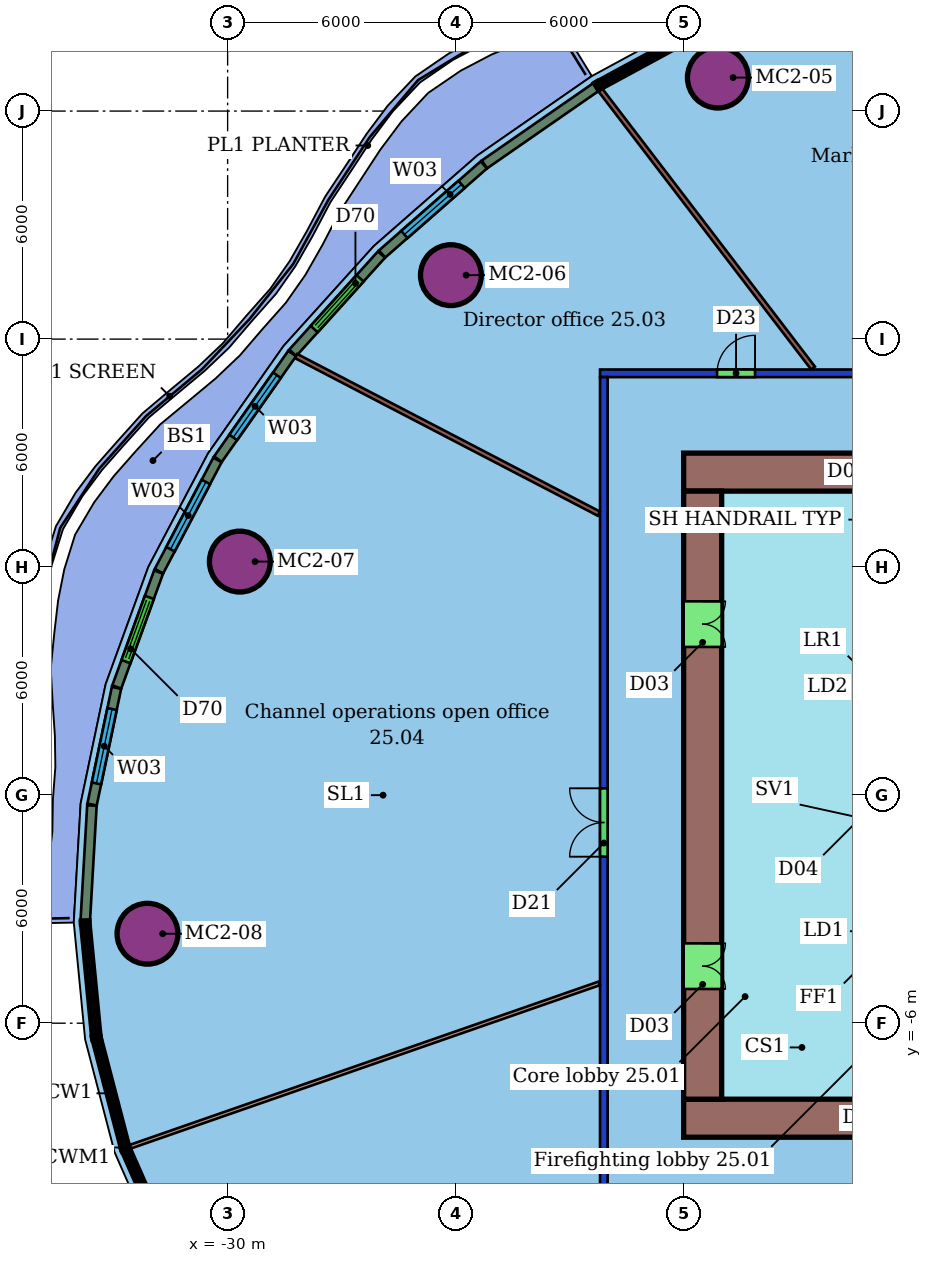
"""IFC4 building model, lengths in metres.
Left out: names, types, materials, properties, quantities, classifications, styles, units other than length and angle.
Written with IfcOpenShell. Run it as: python <this file> out.ifc"""

import sys

from ifc_helpers import new_model, si_unit, direction, frame, frame_2d, origin, origin_2d, place, context, subcontext, project, spatial, rectangle, hollow_circle, extrude, element, fill, save


model = new_model("IFC4")
c1 = context("Model", 3, precision=1e-05, world=origin(), true_north=direction((0.0, 1.0)))
c2 = subcontext(c1, "Body", "Model", "MODEL_VIEW")
j1 = project(units=[si_unit("LENGTHUNIT", "METRE"), si_unit("PLANEANGLEUNIT", "RADIAN")], contexts=[c1])
p1 = place(None, origin())
s1 = spatial("IfcSite", under=j1, at=p1, CompositionType="ELEMENT")
p2 = place(p1, origin())
s2 = spatial("IfcBuilding", under=s1, at=p2, CompositionType="ELEMENT")
p3 = place(p2, frame((0.0, 0.0, 110.2)))
s3 = spatial("IfcBuildingStorey", under=s2, at=p3, CompositionType="ELEMENT", Elevation=110.2)
for number, where, z_axis, x_axis in (
    (1, (-17.1, 18.881, 0.0), (0.0, 0.0, 1.0), (1.0, 0.0, 0.0)),
    (2, (-24.125, 13.683, 0.0), (0.0, 0.0, 1.0), (1.0, 0.0, 0.0)),
    (3, (-29.679, 6.146, 0.0), (0.0, 0.0, 1.0), (1.0, 0.0, 0.0)),
    (4, (-32.109, -3.646, 0.0), (0.0, 0.0, 1.0), (1.0, 0.0, 0.0)),
):
    element("IfcColumn", number, at=place(p3, frame(where, z_axis=z_axis, x_axis=x_axis)), inside=s3, PredefinedType="COLUMN", context=c2, shape_type="SweptSolid", body=[
        extrude(hollow_circle(Radius=0.8, WallThickness=0.055, at=origin_2d()), origin(), (0.0, 0.0, 1.0), 3.45),
    ])
p4 = place(p3, frame((-20.1, -11.0, 0.0), z_axis=(0.0, 0.0, 1.0), x_axis=(0.0, 1.0, 0.0)))
e5 = element("IfcWall", 5, at=p4, inside=s3, PredefinedType="PARTITIONING", context=c2, shape_type="SweptSolid", body=[
    extrude(rectangle(XDim=22.0, YDim=0.2, at=frame_2d((11.0, 0.0))), origin(), (0.0, 0.0, 1.0), 3.0),
])
p5 = place(p4, frame((9.381, 0.0, 0.0)))
e6 = element("IfcOpeningElement", 6, at=p5, cuts=e5, PredefinedType="OPENING", context=c2, shape_type="SweptSolid", body=[
    extrude(rectangle(XDim=1.8, YDim=2.1, at=frame_2d((0.9, 1.05))), frame((0.0, 0.11, 0.0), z_axis=(0.0, -1.0, 0.0), x_axis=(1.0, 0.0, 0.0)), (0.0, 0.0, 1.0), 0.22),
])
p6 = place(p3, frame((-20.2, 11.1, 0.0), z_axis=(0.0, 0.0, 1.0), x_axis=(1.0, 0.0, 0.0)))
e7 = element("IfcWall", 7, at=p6, inside=s3, PredefinedType="PARTITIONING", context=c2, shape_type="SweptSolid", body=[
    extrude(rectangle(XDim=28.4, YDim=0.2, at=frame_2d((14.2, 0.0))), origin(), (0.0, 0.0, 1.0), 3.0),
])
p7 = place(p6, frame((17.12, 0.0, 0.0)))
e8 = element("IfcOpeningElement", 8, at=p7, cuts=e7, PredefinedType="OPENING", context=c2, shape_type="SweptSolid", body=[
    extrude(rectangle(XDim=1.8, YDim=2.1, at=frame_2d((0.9, 1.05))), frame((0.0, 0.11, 0.0), z_axis=(0.0, -1.0, 0.0), x_axis=(1.0, 0.0, 0.0)), (0.0, 0.0, 1.0), 0.22),
])
p8 = place(p6, frame((8.01, 0.0, 0.0)))
e9 = element("IfcOpeningElement", 9, at=p8, cuts=e7, PredefinedType="OPENING", context=c2, shape_type="SweptSolid", body=[
    extrude(rectangle(XDim=1.0, YDim=2.1, at=frame_2d((0.5, 1.05))), frame((0.0, 0.11, 0.0), z_axis=(0.0, -1.0, 0.0), x_axis=(1.0, 0.0, 0.0)), (0.0, 0.0, 1.0), 0.22),
])
p9 = place(p6, frame((3.078, 0.0, 0.0)))
e10 = element("IfcOpeningElement", 10, at=p9, cuts=e7, PredefinedType="OPENING", context=c2, shape_type="SweptSolid", body=[
    extrude(rectangle(XDim=1.0, YDim=2.4, at=frame_2d((0.5, 1.2))), frame((0.0, 0.11, 0.0), z_axis=(0.0, -1.0, 0.0), x_axis=(1.0, 0.0, 0.0)), (0.0, 0.0, 1.0), 0.22),
])
p10 = place(p3, frame((-20.195, 18.558, 0.0), z_axis=(0.0, 0.0, 1.0), x_axis=(0.607534665721, -0.79429316373, 0.0)))
e11 = element("IfcWall", 11, at=p10, inside=s3, PredefinedType="PARTITIONING", context=c2, shape_type="SweptSolid", body=[
    extrude(rectangle(XDim=9.216, YDim=0.125, at=frame_2d((4.608, 0.0))), origin(), (0.0, 0.0, 1.0), 3.45),
])
p11 = place(p3, frame((-28.197, 11.553, 0.0), z_axis=(0.0, 0.0, 1.0), x_axis=(0.887035614959, -0.461701004759, 0.0)))
e12 = element("IfcWall", 12, at=p11, inside=s3, PredefinedType="PARTITIONING", context=c2, shape_type="SweptSolid", body=[
    extrude(rectangle(XDim=8.982, YDim=0.125, at=frame_2d((4.491, 0.0))), origin(), (0.0, 0.0, 1.0), 3.45),
])
p12 = place(p3, frame((-32.574, -9.254, 0.0), z_axis=(0.0, 0.0, 1.0), x_axis=(0.944372639041, 0.328877361079, 0.0)))
e13 = element("IfcWall", 13, at=p12, inside=s3, PredefinedType="PARTITIONING", context=c2, shape_type="SweptSolid", body=[
    extrude(rectangle(XDim=13.085, YDim=0.1, at=frame_2d((6.542, 0.0))), origin(), (0.0, 0.0, 1.0), 3.45),
])
p13 = place(p3, frame((-20.305, 18.633, 0.0), z_axis=(0.0, 0.0, 1.0), x_axis=(-0.821702391874, -0.56991681778, 0.0)))
e14 = element("IfcWall", 14, at=p13, inside=s3, PredefinedType="SOLIDWALL", context=c2, shape_type="SweptSolid", body=[
    extrude(rectangle(XDim=3.573, YDim=0.25, at=frame_2d((1.787, 0.0))), origin(), (0.0, 0.0, 1.0), 3.05),
])
p14 = place(p3, frame((-23.259, 16.583, 0.0), z_axis=(0.0, 0.0, 1.0), x_axis=(-0.752389619374, -0.658718346988, 0.0)))
e15 = element("IfcWall", 15, at=p14, inside=s3, PredefinedType="SOLIDWALL", context=c2, shape_type="SweptSolid", body=[
    extrude(rectangle(XDim=3.558, YDim=0.25, at=frame_2d((1.779, 0.0))), origin(), (0.0, 0.0, 1.0), 3.05),
])
p15 = place(p14, frame((0.779, 0.0, 0.9)))
e16 = element("IfcOpeningElement", 16, at=p15, cuts=e15, PredefinedType="OPENING", context=c2, shape_type="SweptSolid", body=[
    extrude(rectangle(XDim=2.0, YDim=2.1, at=frame_2d((1.0, 1.05))), frame((0.0, 0.135, 0.0), z_axis=(0.0, -1.0, 0.0), x_axis=(1.0, 0.0, 0.0)), (0.0, 0.0, 1.0), 0.27),
])
p16 = place(p3, frame((-25.951, 14.224, 0.0), z_axis=(0.0, 0.0, 1.0), x_axis=(-0.670380889725, -0.74201715795, 0.0)))
e17 = element("IfcWall", 17, at=p16, inside=s3, PredefinedType="SOLIDWALL", context=c2, shape_type="SweptSolid", body=[
    extrude(rectangle(XDim=3.483, YDim=0.25, at=frame_2d((1.742, 0.0))), origin(), (0.0, 0.0, 1.0), 3.05),
])
p17 = place(p16, frame((0.842, 0.0, 0.0)))
e18 = element("IfcOpeningElement", 18, at=p17, cuts=e17, PredefinedType="OPENING", context=c2, shape_type="SweptSolid", body=[
    extrude(rectangle(XDim=1.8, YDim=2.4, at=frame_2d((0.9, 1.2))), frame((0.0, 0.135, 0.0), z_axis=(0.0, -1.0, 0.0), x_axis=(1.0, 0.0, 0.0)), (0.0, 0.0, 1.0), 0.27),
])
p18 = place(p3, frame((-28.301, 11.622, 0.0), z_axis=(0.0, 0.0, 1.0), x_axis=(-0.57497541368, -0.818170687365, 0.0)))
e19 = element("IfcWall", 19, at=p18, inside=s3, PredefinedType="SOLIDWALL", context=c2, shape_type="SweptSolid", body=[
    extrude(rectangle(XDim=3.398, YDim=0.25, at=frame_2d((1.699, 0.0))), origin(), (0.0, 0.0, 1.0), 3.05),
])
p19 = place(p18, frame((0.699, 0.0, 0.9)))
e20 = element("IfcOpeningElement", 20, at=p19, cuts=e19, PredefinedType="OPENING", context=c2, shape_type="SweptSolid", body=[
    extrude(rectangle(XDim=2.0, YDim=2.1, at=frame_2d((1.0, 1.05))), frame((0.0, 0.135, 0.0), z_axis=(0.0, -1.0, 0.0), x_axis=(1.0, 0.0, 0.0)), (0.0, 0.0, 1.0), 0.27),
])
p20 = place(p3, frame((-30.267, 8.821, 0.0), z_axis=(0.0, 0.0, 1.0), x_axis=(-0.465454364303, -0.885071881121, 0.0)))
e21 = element("IfcWall", 21, at=p20, inside=s3, PredefinedType="SOLIDWALL", context=c2, shape_type="SweptSolid", body=[
    extrude(rectangle(XDim=3.308, YDim=0.25, at=frame_2d((1.654, 0.0))), origin(), (0.0, 0.0, 1.0), 3.05),
])
p21 = place(p20, frame((0.654, 0.0, 0.9)))
e22 = element("IfcOpeningElement", 22, at=p21, cuts=e21, PredefinedType="OPENING", context=c2, shape_type="SweptSolid", body=[
    extrude(rectangle(XDim=2.0, YDim=2.1, at=frame_2d((1.0, 1.05))), frame((0.0, 0.135, 0.0), z_axis=(0.0, -1.0, 0.0), x_axis=(1.0, 0.0, 0.0)), (0.0, 0.0, 1.0), 0.27),
])
p22 = place(p3, frame((-31.817, 5.871, 0.0), z_axis=(0.0, 0.0, 1.0), x_axis=(-0.341877080841, -0.93974467894, 0.0)))
e23 = element("IfcWall", 23, at=p22, inside=s3, PredefinedType="SOLIDWALL", context=c2, shape_type="SweptSolid", body=[
    extrude(rectangle(XDim=3.218, YDim=0.25, at=frame_2d((1.609, 0.0))), origin(), (0.0, 0.0, 1.0), 3.05),
])
p23 = place(p22, frame((0.709, 0.0, 0.0)))
e24 = element("IfcOpeningElement", 24, at=p23, cuts=e23, PredefinedType="OPENING", context=c2, shape_type="SweptSolid", body=[
    extrude(rectangle(XDim=1.8, YDim=2.4, at=frame_2d((0.9, 1.2))), frame((0.0, 0.135, 0.0), z_axis=(0.0, -1.0, 0.0), x_axis=(1.0, 0.0, 0.0)), (0.0, 0.0, 1.0), 0.27),
])
p24 = place(p3, frame((-32.924, 2.822, 0.0), z_axis=(0.0, 0.0, 1.0), x_axis=(-0.205198000351, -0.978720481369, 0.0)))
e25 = element("IfcWall", 25, at=p24, inside=s3, PredefinedType="SOLIDWALL", context=c2, shape_type="SweptSolid", body=[
    extrude(rectangle(XDim=3.135, YDim=0.25, at=frame_2d((1.567, 0.0))), origin(), (0.0, 0.0, 1.0), 3.05),
])
p25 = place(p24, frame((0.567, 0.0, 0.9)))
e26 = element("IfcOpeningElement", 26, at=p25, cuts=e25, PredefinedType="OPENING", context=c2, shape_type="SweptSolid", body=[
    extrude(rectangle(XDim=2.0, YDim=2.1, at=frame_2d((1.0, 1.05))), frame((0.0, 0.135, 0.0), z_axis=(0.0, -1.0, 0.0), x_axis=(1.0, 0.0, 0.0)), (0.0, 0.0, 1.0), 0.27),
])
p26 = place(p3, frame((-33.571, -0.273, 0.0), z_axis=(0.0, 0.0, 1.0), x_axis=(-0.057638311383, -0.998337530628, 0.0)))
e27 = element("IfcWall", 27, at=p26, inside=s3, PredefinedType="SOLIDWALL", context=c2, shape_type="SweptSolid", body=[
    extrude(rectangle(XDim=3.024, YDim=0.25, at=frame_2d((1.512, 0.0))), origin(), (0.0, 0.0, 1.0), 3.05),
])
p27 = place(p3, frame((-6.0, 8.5, 0.0), z_axis=(0.0, 0.0, 1.0), x_axis=(-1.0, 0.0, 0.0)))
e28 = element("IfcWall", 28, at=p27, inside=s3, PredefinedType="SHEAR", context=c2, shape_type="SweptSolid", body=[
    extrude(rectangle(XDim=12.0, YDim=1.0, at=frame_2d((6.0, 0.0))), origin(), (0.0, 0.0, 1.0), 3.3),
])
p28 = place(p27, frame((5.2, 0.0, 0.0)))
e29 = element("IfcOpeningElement", 29, at=p28, cuts=e28, PredefinedType="OPENING", context=c2, shape_type="SweptSolid", body=[
    extrude(rectangle(XDim=1.2, YDim=2.1, at=frame_2d((0.6, 1.05))), frame((0.0, 0.51, 0.0), z_axis=(0.0, -1.0, 0.0), x_axis=(1.0, 0.0, 0.0)), (0.0, 0.0, 1.0), 1.02),
])
p29 = place(p3, frame((-18.0, -8.5, 0.0), z_axis=(0.0, 0.0, 1.0), x_axis=(1.0, 0.0, 0.0)))
e30 = element("IfcWall", 30, at=p29, inside=s3, PredefinedType="SHEAR", context=c2, shape_type="SweptSolid", body=[
    extrude(rectangle(XDim=24.0, YDim=1.0, at=frame_2d((12.0, 0.0))), origin(), (0.0, 0.0, 1.0), 3.3),
])
p30 = place(p29, frame((6.0, 0.0, 0.0)))
e31 = element("IfcOpeningElement", 31, at=p30, cuts=e30, PredefinedType="OPENING", context=c2, shape_type="SweptSolid", body=[
    extrude(rectangle(XDim=1.2, YDim=2.1, at=frame_2d((0.6, 1.05))), frame((0.0, 0.51, 0.0), z_axis=(0.0, -1.0, 0.0), x_axis=(1.0, 0.0, 0.0)), (0.0, 0.0, 1.0), 1.02),
])
p31 = place(p3, frame((-17.5, 8.0, 0.0), z_axis=(0.0, 0.0, 1.0), x_axis=(0.0, -1.0, 0.0)))
e32 = element("IfcWall", 32, at=p31, inside=s3, PredefinedType="SHEAR", context=c2, shape_type="SweptSolid", body=[
    extrude(rectangle(XDim=16.0, YDim=1.0, at=frame_2d((8.0, 0.0))), origin(), (0.0, 0.0, 1.0), 3.3),
])
p32 = place(p31, frame((11.9, 0.0, 0.0)))
e33 = element("IfcOpeningElement", 33, at=p32, cuts=e32, PredefinedType="OPENING", context=c2, shape_type="SweptSolid", body=[
    extrude(rectangle(XDim=1.2, YDim=2.1, at=frame_2d((0.6, 1.05))), frame((0.0, 0.51, 0.0), z_axis=(0.0, -1.0, 0.0), x_axis=(1.0, 0.0, 0.0)), (0.0, 0.0, 1.0), 1.02),
])
p33 = place(p31, frame((2.9, 0.0, 0.0)))
e34 = element("IfcOpeningElement", 34, at=p33, cuts=e32, PredefinedType="OPENING", context=c2, shape_type="SweptSolid", body=[
    extrude(rectangle(XDim=1.2, YDim=2.1, at=frame_2d((0.6, 1.05))), frame((0.0, 0.51, 0.0), z_axis=(0.0, -1.0, 0.0), x_axis=(1.0, 0.0, 0.0)), (0.0, 0.0, 1.0), 1.02),
])
p34 = place(p9, origin())
e35 = element("IfcDoor", 35, at=p34, inside=s3, OperationType="SINGLE_SWING_RIGHT", PredefinedType="DOOR", context=c2, shape_type="SweptSolid", body=[
    extrude(rectangle(XDim=1.0, YDim=2.4, at=frame_2d((0.5, 1.2))), frame((0.0, 0.025, 0.0), z_axis=(0.0, -1.0, 0.0), x_axis=(1.0, 0.0, 0.0)), (0.0, 0.0, 1.0), 0.05),
])
fill(e10, e35)
p35 = place(p5, origin())
e36 = element("IfcDoor", 36, at=p35, inside=s3, OperationType="DOUBLE_DOOR_SINGLE_SWING", PredefinedType="DOOR", context=c2, shape_type="SweptSolid", body=[
    extrude(rectangle(XDim=1.8, YDim=2.1, at=frame_2d((0.9, 1.05))), frame((0.0, 0.025, 0.0), z_axis=(0.0, -1.0, 0.0), x_axis=(1.0, 0.0, 0.0)), (0.0, 0.0, 1.0), 0.05),
])
fill(e6, e36)
p36 = place(p15, origin())
e37 = element("IfcWindow", 37, at=p36, inside=s3, PartitioningType="SINGLE_PANEL", PredefinedType="WINDOW", context=c2, shape_type="SweptSolid", body=[
    extrude(rectangle(XDim=2.0, YDim=2.1, at=frame_2d((1.0, 1.05))), frame((0.0, 0.03, 0.0), z_axis=(0.0, -1.0, 0.0), x_axis=(1.0, 0.0, 0.0)), (0.0, 0.0, 1.0), 0.06),
])
fill(e16, e37)
p37 = place(p17, origin())
e38 = element("IfcDoor", 38, at=p37, inside=s3, OperationType="DOUBLE_DOOR_SLIDING", PredefinedType="DOOR", context=c2, shape_type="SweptSolid", body=[
    extrude(rectangle(XDim=1.8, YDim=2.4, at=frame_2d((0.9, 1.2))), frame((0.0, 0.025, 0.0), z_axis=(0.0, -1.0, 0.0), x_axis=(1.0, 0.0, 0.0)), (0.0, 0.0, 1.0), 0.05),
])
fill(e18, e38)
p38 = place(p19, origin())
e39 = element("IfcWindow", 39, at=p38, inside=s3, PartitioningType="SINGLE_PANEL", PredefinedType="WINDOW", context=c2, shape_type="SweptSolid", body=[
    extrude(rectangle(XDim=2.0, YDim=2.1, at=frame_2d((1.0, 1.05))), frame((0.0, 0.03, 0.0), z_axis=(0.0, -1.0, 0.0), x_axis=(1.0, 0.0, 0.0)), (0.0, 0.0, 1.0), 0.06),
])
fill(e20, e39)
p39 = place(p21, origin())
e40 = element("IfcWindow", 40, at=p39, inside=s3, PartitioningType="SINGLE_PANEL", PredefinedType="WINDOW", context=c2, shape_type="SweptSolid", body=[
    extrude(rectangle(XDim=2.0, YDim=2.1, at=frame_2d((1.0, 1.05))), frame((0.0, 0.03, 0.0), z_axis=(0.0, -1.0, 0.0), x_axis=(1.0, 0.0, 0.0)), (0.0, 0.0, 1.0), 0.06),
])
fill(e22, e40)
p40 = place(p23, origin())
e41 = element("IfcDoor", 41, at=p40, inside=s3, OperationType="DOUBLE_DOOR_SLIDING", PredefinedType="DOOR", context=c2, shape_type="SweptSolid", body=[
    extrude(rectangle(XDim=1.8, YDim=2.4, at=frame_2d((0.9, 1.2))), frame((0.0, 0.025, 0.0), z_axis=(0.0, -1.0, 0.0), x_axis=(1.0, 0.0, 0.0)), (0.0, 0.0, 1.0), 0.05),
])
fill(e24, e41)
p41 = place(p25, origin())
e42 = element("IfcWindow", 42, at=p41, inside=s3, PartitioningType="SINGLE_PANEL", PredefinedType="WINDOW", context=c2, shape_type="SweptSolid", body=[
    extrude(rectangle(XDim=2.0, YDim=2.1, at=frame_2d((1.0, 1.05))), frame((0.0, 0.03, 0.0), z_axis=(0.0, -1.0, 0.0), x_axis=(1.0, 0.0, 0.0)), (0.0, 0.0, 1.0), 0.06),
])
fill(e26, e42)
p42 = place(p32, origin())
e43 = element("IfcDoor", 43, at=p42, inside=s3, OperationType="DOUBLE_DOOR_SINGLE_SWING", PredefinedType="NOTDEFINED", context=c2, shape_type="SweptSolid", body=[
    extrude(rectangle(XDim=1.2, YDim=2.1, at=frame_2d((0.6, 1.05))), frame((0.0, 0.025, 0.0), z_axis=(0.0, -1.0, 0.0), x_axis=(1.0, 0.0, 0.0)), (0.0, 0.0, 1.0), 0.05),
])
fill(e33, e43)
p43 = place(p33, origin())
e44 = element("IfcDoor", 44, at=p43, inside=s3, OperationType="DOUBLE_DOOR_SINGLE_SWING", PredefinedType="NOTDEFINED", context=c2, shape_type="SweptSolid", body=[
    extrude(rectangle(XDim=1.2, YDim=2.1, at=frame_2d((0.6, 1.05))), frame((0.0, 0.025, 0.0), z_axis=(0.0, -1.0, 0.0), x_axis=(1.0, 0.0, 0.0)), (0.0, 0.0, 1.0), 0.05),
])
fill(e34, e44)
save(model, sys.argv[1])
